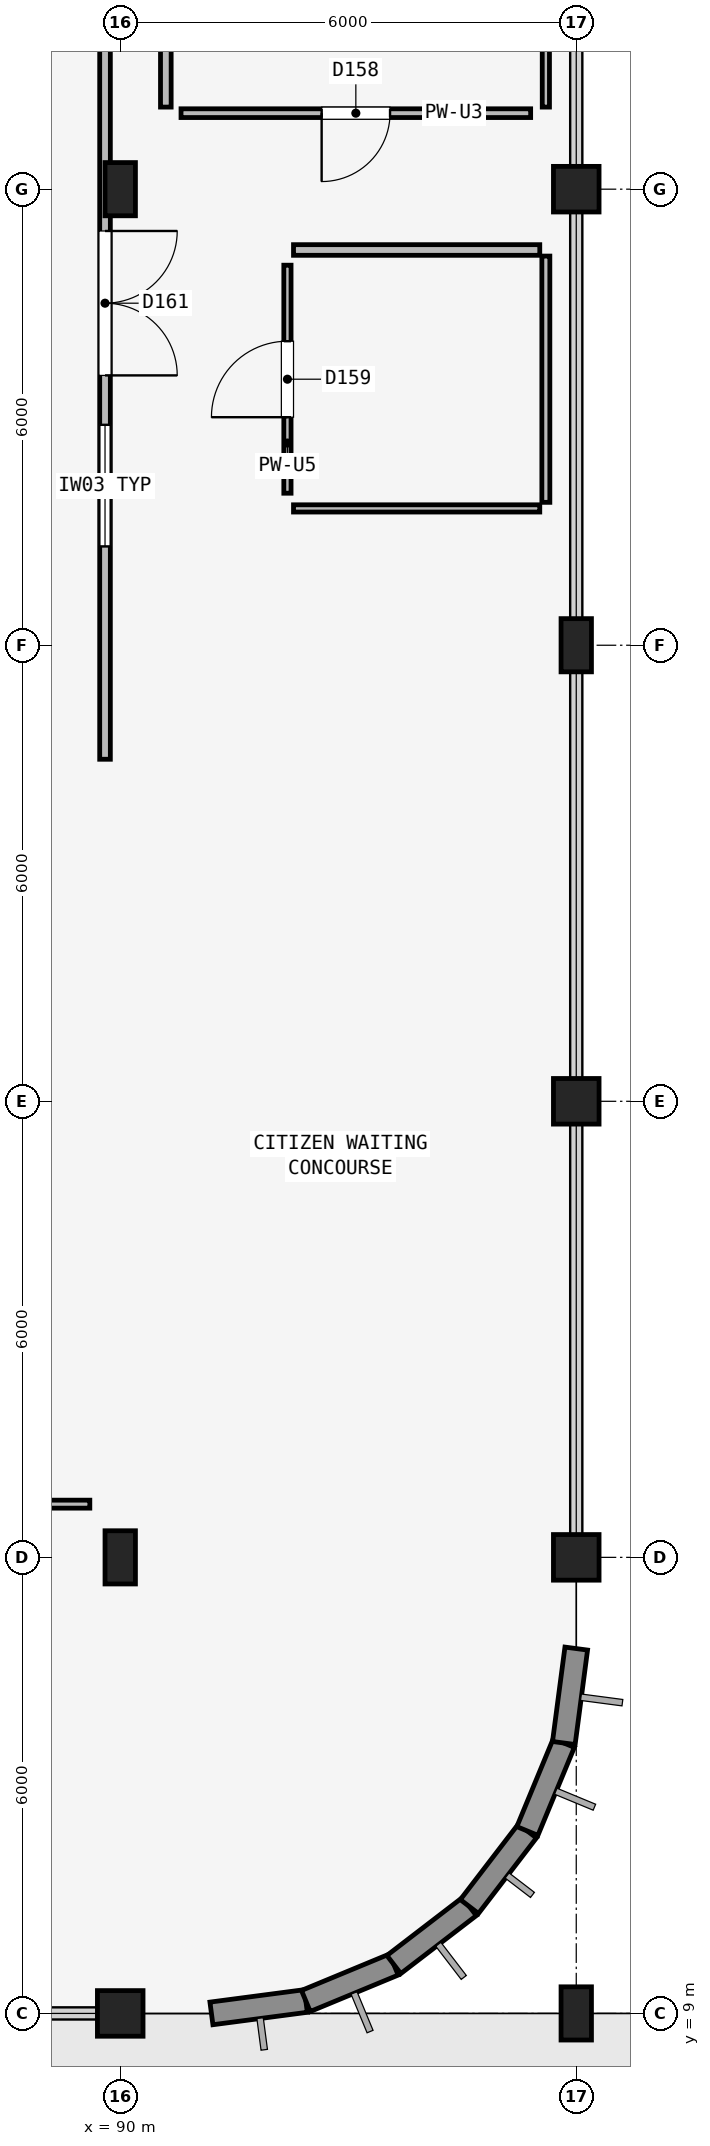
"""IFC4 building model, lengths in metres.
Left out: names, types, materials, properties, quantities, classifications, styles, units other than length and angle.
Written with IfcOpenShell. Run it as: python <this file> out.ifc"""

import sys

from ifc_helpers import new_model, si_unit, direction, frame, frame_2d, origin, origin_2d, place, context, subcontext, project, spatial, rectangle, extrude, element, fill, save


model = new_model("IFC4")
c1 = context("Model", 3, precision=1e-05, world=origin(), true_north=direction((0.0, 1.0)))
c2 = subcontext(c1, "Body", "Model", "MODEL_VIEW")
j1 = project(units=[si_unit("LENGTHUNIT", "METRE"), si_unit("PLANEANGLEUNIT", "RADIAN")], contexts=[c1])
p1 = place(None, origin())
s1 = spatial("IfcSite", under=j1, at=p1, CompositionType="ELEMENT")
p2 = place(p1, origin())
s2 = spatial("IfcBuilding", under=s1, at=p2, CompositionType="ELEMENT")
p3 = place(p2, origin())
s3 = spatial("IfcBuildingStorey", under=s2, at=p3, CompositionType="ELEMENT", Elevation=0.0)
p4 = place(p3, frame((90.0, 9.0, 0.0), z_axis=(0.0, 0.0, 1.0), x_axis=(1.0, 0.0, 0.0)))
e1 = element("IfcColumn", 1, at=p4, inside=s3, PredefinedType="COLUMN", context=c2, shape_type="SweptSolid", body=[
    extrude(rectangle(XDim=0.6, YDim=0.6, at=origin_2d()), origin(), (0.0, 0.0, 1.0), 4.8),
])
for number, where, z_axis, x_axis in (
    (2, (90.0, 15.0, 0.0), (0.0, 0.0, 1.0), (1.0, 0.0, 0.0)),
    (3, (90.0, 33.0, 0.0), (0.0, 0.0, 1.0), (1.0, 0.0, 0.0)),
    (4, (96.0, 9.0, 0.0), (0.0, 0.0, 1.0), (1.0, 0.0, 0.0)),
):
    element("IfcColumn", number, at=place(p3, frame(where, z_axis=z_axis, x_axis=x_axis)), inside=s3, PredefinedType="COLUMN", context=c2, shape_type="SweptSolid", body=[
        extrude(rectangle(XDim=0.4, YDim=0.7, at=origin_2d()), origin(), (0.0, 0.0, 1.0), 4.8),
    ])
for number, where, z_axis, x_axis in (
    (5, (96.0, 15.0, 0.0), (0.0, 0.0, 1.0), (1.0, 0.0, 0.0)),
    (6, (96.0, 21.0, 0.0), (0.0, 0.0, 1.0), (1.0, 0.0, 0.0)),
):
    element("IfcColumn", number, at=place(p3, frame(where, z_axis=z_axis, x_axis=x_axis)), inside=s3, PredefinedType="COLUMN", context=c2, shape_type="SweptSolid", body=[
        extrude(rectangle(XDim=0.6, YDim=0.6, at=origin_2d()), origin(), (0.0, 0.0, 1.0), 4.8),
    ])
p5 = place(p3, frame((96.0, 27.0, 0.0), z_axis=(0.0, 0.0, 1.0), x_axis=(1.0, 0.0, 0.0)))
e7 = element("IfcColumn", 7, at=p5, inside=s3, PredefinedType="COLUMN", context=c2, shape_type="SweptSolid", body=[
    extrude(rectangle(XDim=0.4, YDim=0.7, at=origin_2d()), origin(), (0.0, 0.0, 1.0), 4.8),
])
p6 = place(p3, frame((96.0, 33.0, 0.0), z_axis=(0.0, 0.0, 1.0), x_axis=(1.0, 0.0, 0.0)))
e8 = element("IfcColumn", 8, at=p6, inside=s3, PredefinedType="COLUMN", context=c2, shape_type="SweptSolid", body=[
    extrude(rectangle(XDim=0.6, YDim=0.6, at=origin_2d()), origin(), (0.0, 0.0, 1.0), 4.8),
])
for number, where, z_axis, x_axis in (
    (9, (91.2, 9.0, 0.0), (0.0, 0.0, 1.0), (0.991, 0.131, 0.0)),
    (10, (92.442, 9.164, 0.0), (0.0, 0.0, 1.0), (0.924, 0.383, 0.0)),
):
    element("IfcWall", number, at=place(p3, frame(where, z_axis=z_axis, x_axis=x_axis)), inside=s3, PredefinedType="SOLIDWALL", context=c2, shape_type="SweptSolid", body=[
        extrude(rectangle(XDim=1.253, YDim=0.3, at=frame_2d((0.626, 0.0))), origin(), (0.0, 0.0, 1.0), 2.99),
    ])
for number, where, z_axis, x_axis in (
    (11, (93.6, 9.643, 0.0), (0.0, 0.0, 1.0), (0.793, 0.609, 0.0)),
    (12, (94.594, 10.406, 0.0), (0.0, 0.0, 1.0), (0.609, 0.793, 0.0)),
):
    element("IfcWall", number, at=place(p3, frame(where, z_axis=z_axis, x_axis=x_axis)), inside=s3, PredefinedType="SOLIDWALL", context=c2, shape_type="SweptSolid", body=[
        extrude(rectangle(XDim=1.253, YDim=0.3, at=frame_2d((0.626, 0.0))), origin(), (0.0, 0.0, 1.0), 4.495),
    ])
for number, where, z_axis, x_axis in (
    (13, (95.357, 11.4, 0.0), (0.0, 0.0, 1.0), (0.383, 0.924, 0.0)),
    (14, (95.836, 12.558, 0.0), (0.0, 0.0, 1.0), (0.131, 0.991, 0.0)),
):
    element("IfcWall", number, at=place(p3, frame(where, z_axis=z_axis, x_axis=x_axis)), inside=s3, PredefinedType="SOLIDWALL", context=c2, shape_type="SweptSolid", body=[
        extrude(rectangle(XDim=1.253, YDim=0.3, at=frame_2d((0.626, 0.0))), origin(), (0.0, 0.0, 1.0), 4.09),
    ])
p7 = place(p3, frame((95.4, 34.0, 0.0), z_axis=(0.0, 0.0, 1.0), x_axis=(-1.0, 0.0, 0.0)))
e15 = element("IfcWall", 15, at=p7, inside=s3, PredefinedType="PARTITIONING", context=c2, shape_type="SweptSolid", body=[
    extrude(rectangle(XDim=4.6, YDim=0.115, at=frame_2d((2.3, 0.0))), origin(), (0.0, 0.0, 1.0), 4.09),
])
p8 = place(p7, frame((1.85, 0.0, 0.0)))
e16 = element("IfcOpeningElement", 16, at=p8, cuts=e15, PredefinedType="OPENING", context=c2, shape_type="SweptSolid", body=[
    extrude(rectangle(XDim=0.9, YDim=2.1, at=frame_2d((0.45, 1.05))), frame((0.0, 0.067, 0.0), z_axis=(0.0, -1.0, 0.0), x_axis=(1.0, 0.0, 0.0)), (0.0, 0.0, 1.0), 0.135),
])
p9 = place(p3, frame((92.2, 29.0, 0.0), z_axis=(0.0, 0.0, 1.0), x_axis=(0.0, 1.0, 0.0)))
e17 = element("IfcWall", 17, at=p9, inside=s3, PredefinedType="PARTITIONING", context=c2, shape_type="SweptSolid", body=[
    extrude(rectangle(XDim=3.0, YDim=0.095, at=frame_2d((1.5, 0.0))), origin(), (0.0, 0.0, 1.0), 4.49),
])
p10 = place(p9, frame((1.0, 0.0, 0.0)))
e18 = element("IfcOpeningElement", 18, at=p10, cuts=e17, PredefinedType="OPENING", context=c2, shape_type="SweptSolid", body=[
    extrude(rectangle(XDim=1.0, YDim=2.1, at=frame_2d((0.5, 1.05))), frame((0.0, 0.057, 0.0), z_axis=(0.0, -1.0, 0.0), x_axis=(1.0, 0.0, 0.0)), (0.0, 0.0, 1.0), 0.115),
])
p11 = place(p3, frame((89.6, 15.7, 0.0), z_axis=(0.0, 0.0, 1.0), x_axis=(-1.0, 0.0, 0.0)))
e19 = element("IfcWall", 19, at=p11, inside=s3, PredefinedType="PARTITIONING", context=c2, shape_type="SweptSolid", body=[
    extrude(rectangle(XDim=29.2, YDim=0.105, at=frame_2d((14.6, 0.0))), origin(), (0.0, 0.0, 1.0), 4.49),
])
p12 = place(p11, frame((13.65, 0.0, 0.0)))
e20 = element("IfcOpeningElement", 20, at=p12, cuts=e19, PredefinedType="OPENING", context=c2, shape_type="SweptSolid", body=[
    extrude(rectangle(XDim=1.9, YDim=2.3, at=frame_2d((0.95, 1.15))), frame((0.0, 0.062, 0.0), z_axis=(0.0, -1.0, 0.0), x_axis=(1.0, 0.0, 0.0)), (0.0, 0.0, 1.0), 0.125),
])
p13 = place(p11, frame((16.2, 0.0, 1.0)))
e21 = element("IfcOpeningElement", 21, at=p13, cuts=e19, PredefinedType="OPENING", context=c2, shape_type="SweptSolid", body=[
    extrude(rectangle(XDim=2.6, YDim=1.2, at=frame_2d((1.3, 0.6))), frame((0.0, 0.062, 0.0), z_axis=(0.0, -1.0, 0.0), x_axis=(1.0, 0.0, 0.0)), (0.0, 0.0, 1.0), 0.125),
])
p14 = place(p3, frame((89.8, 38.4, 0.0), z_axis=(0.0, 0.0, 1.0), x_axis=(0.0, -1.0, 0.0)))
e22 = element("IfcWall", 22, at=p14, inside=s3, PredefinedType="PARTITIONING", context=c2, shape_type="SweptSolid", body=[
    extrude(rectangle(XDim=12.9, YDim=0.14, at=frame_2d((6.45, 0.0))), origin(), (0.0, 0.0, 1.0), 3.31),
])
p15 = place(p14, frame((5.95, 0.0, 0.0)))
e23 = element("IfcOpeningElement", 23, at=p15, cuts=e22, PredefinedType="OPENING", context=c2, shape_type="SweptSolid", body=[
    extrude(rectangle(XDim=1.9, YDim=2.3, at=frame_2d((0.95, 1.15))), frame((0.0, 0.08, 0.0), z_axis=(0.0, -1.0, 0.0), x_axis=(1.0, 0.0, 0.0)), (0.0, 0.0, 1.0), 0.16),
])
p16 = place(p14, frame((8.5, 0.0, 1.05)))
e24 = element("IfcOpeningElement", 24, at=p16, cuts=e22, PredefinedType="OPENING", context=c2, shape_type="SweptSolid", body=[
    extrude(rectangle(XDim=1.6, YDim=1.1, at=frame_2d((0.8, 0.55))), frame((0.0, 0.08, 0.0), z_axis=(0.0, -1.0, 0.0), x_axis=(1.0, 0.0, 0.0)), (0.0, 0.0, 1.0), 0.16),
])
p17 = place(p3, frame((95.6, 38.42, 0.0), z_axis=(0.0, 0.0, 1.0), x_axis=(0.0, -1.0, 0.0)))
e25 = element("IfcWall", 25, at=p17, inside=s3, PredefinedType="PARTITIONING", context=c2, shape_type="SweptSolid", body=[
    extrude(rectangle(XDim=4.34, YDim=0.095, at=frame_2d((2.17, 0.0))), origin(), (0.0, 0.0, 1.0), 4.49),
])
p18 = place(p3, frame((90.6, 34.08, 0.0), z_axis=(0.0, 0.0, 1.0), x_axis=(0.0, 1.0, 0.0)))
e26 = element("IfcWall", 26, at=p18, inside=s3, PredefinedType="PARTITIONING", context=c2, shape_type="SweptSolid", body=[
    extrude(rectangle(XDim=4.34, YDim=0.14, at=frame_2d((2.17, 0.0))), origin(), (0.0, 0.0, 1.0), 4.49),
])
p19 = place(p3, frame((95.6, 32.12, 0.0), z_axis=(0.0, 0.0, 1.0), x_axis=(0.0, -1.0, 0.0)))
e27 = element("IfcWall", 27, at=p19, inside=s3, PredefinedType="PARTITIONING", context=c2, shape_type="SweptSolid", body=[
    extrude(rectangle(XDim=3.24, YDim=0.105, at=frame_2d((1.62, 0.0))), origin(), (0.0, 0.0, 1.0), 4.49),
])
p20 = place(p3, frame((95.52, 28.8, 0.0), z_axis=(0.0, 0.0, 1.0), x_axis=(-1.0, 0.0, 0.0)))
e28 = element("IfcWall", 28, at=p20, inside=s3, PredefinedType="PARTITIONING", context=c2, shape_type="SweptSolid", body=[
    extrude(rectangle(XDim=3.24, YDim=0.095, at=frame_2d((1.62, 0.0))), origin(), (0.0, 0.0, 1.0), 4.49),
])
p21 = place(p3, frame((92.28, 32.2, 0.0), z_axis=(0.0, 0.0, 1.0), x_axis=(1.0, 0.0, 0.0)))
e29 = element("IfcWall", 29, at=p21, inside=s3, PredefinedType="PARTITIONING", context=c2, shape_type="SweptSolid", body=[
    extrude(rectangle(XDim=3.24, YDim=0.14, at=frame_2d((1.62, 0.0))), origin(), (0.0, 0.0, 1.0), 4.49),
])
p22 = place(p8, origin())
e30 = element("IfcDoor", 30, at=p22, inside=s3, OperationType="SINGLE_SWING_RIGHT", PredefinedType="DOOR", context=c2, shape_type="SweptSolid", body=[
    extrude(rectangle(XDim=0.9, YDim=2.1, at=frame_2d((0.45, 1.05))), frame((0.0, 0.025, 0.0), z_axis=(0.0, -1.0, 0.0), x_axis=(1.0, 0.0, 0.0)), (0.0, 0.0, 1.0), 0.05),
])
fill(e16, e30)
p23 = place(p10, origin())
e31 = element("IfcDoor", 31, at=p23, inside=s3, OperationType="SINGLE_SWING_LEFT", PredefinedType="DOOR", context=c2, shape_type="SweptSolid", body=[
    extrude(rectangle(XDim=1.0, YDim=2.1, at=frame_2d((0.5, 1.05))), frame((0.0, 0.025, 0.0), z_axis=(0.0, -1.0, 0.0), x_axis=(1.0, 0.0, 0.0)), (0.0, 0.0, 1.0), 0.05),
])
fill(e18, e31)
p24 = place(p15, origin())
e32 = element("IfcDoor", 32, at=p24, inside=s3, OperationType="DOUBLE_DOOR_SINGLE_SWING", PredefinedType="DOOR", context=c2, shape_type="SweptSolid", body=[
    extrude(rectangle(XDim=1.9, YDim=2.3, at=frame_2d((0.95, 1.15))), frame((0.0, 0.025, 0.0), z_axis=(0.0, -1.0, 0.0), x_axis=(1.0, 0.0, 0.0)), (0.0, 0.0, 1.0), 0.05),
])
fill(e23, e32)
p25 = place(p16, origin())
e33 = element("IfcWindow", 33, at=p25, inside=s3, PartitioningType="SINGLE_PANEL", PredefinedType="WINDOW", context=c2, shape_type="SweptSolid", body=[
    extrude(rectangle(XDim=1.6, YDim=1.1, at=frame_2d((0.8, 0.55))), frame((0.0, 0.03, 0.0), z_axis=(0.0, -1.0, 0.0), x_axis=(1.0, 0.0, 0.0)), (0.0, 0.0, 1.0), 0.06),
])
fill(e24, e33)
save(model, sys.argv[1])
